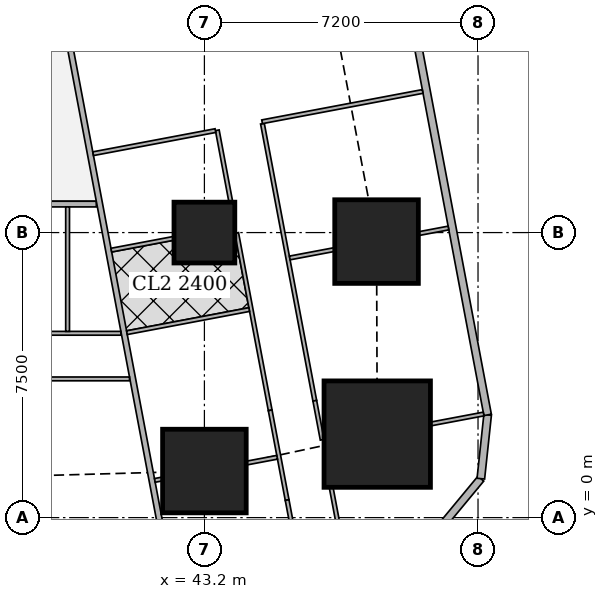
"""IFC4 building model, lengths in metres.
Left out: names, types, materials, properties, quantities, classifications, styles, units other than length and angle.
Written with IfcOpenShell. Run it as: python <this file> out.ifc"""

import sys

from ifc_helpers import new_model, si_unit, direction, frame, frame_2d, origin, origin_2d, place, context, subcontext, project, spatial, rectangle, extrude, element, fill, save


model = new_model("IFC4")
c1 = context("Model", 3, precision=1e-05, world=origin(), true_north=direction((0.0, 1.0)))
c2 = subcontext(c1, "Body", "Model", "MODEL_VIEW")
j1 = project(units=[si_unit("LENGTHUNIT", "METRE"), si_unit("PLANEANGLEUNIT", "RADIAN")], contexts=[c1])
p1 = place(None, origin())
s1 = spatial("IfcSite", under=j1, at=p1, CompositionType="ELEMENT")
p2 = place(p1, origin())
s2 = spatial("IfcBuilding", under=s1, at=p2, CompositionType="ELEMENT")
p3 = place(p2, frame((0.0, 0.0, 81.65)))
s3 = spatial("IfcBuildingStorey", under=s2, at=p3, CompositionType="ELEMENT", Elevation=81.65)
p4 = place(p3, frame((43.2, 1.225, 0.0), z_axis=(0.0, 0.0, 1.0), x_axis=(1.0, 0.0, 0.0)))
e1 = element("IfcColumn", 1, at=p4, inside=s3, PredefinedType="COLUMN", context=c2, shape_type="SweptSolid", body=[
    extrude(rectangle(XDim=2.2, YDim=2.2, at=origin_2d()), origin(), (0.0, 0.0, 1.0), 3.75),
])
p5 = place(p3, frame((47.748, 2.197, 0.0), z_axis=(0.0, 0.0, 1.0), x_axis=(1.0, 0.0, 0.0)))
e2 = element("IfcColumn", 2, at=p5, inside=s3, PredefinedType="COLUMN", context=c2, shape_type="SweptSolid", body=[
    extrude(rectangle(XDim=2.8, YDim=2.8, at=origin_2d()), origin(), (0.0, 0.0, 1.0), 3.75),
])
p6 = place(p3, frame((43.2, 7.5, 0.0), z_axis=(0.0, 0.0, 1.0), x_axis=(1.0, 0.0, 0.0)))
e3 = element("IfcColumn", 3, at=p6, inside=s3, PredefinedType="COLUMN", context=c2, shape_type="SweptSolid", body=[
    extrude(rectangle(XDim=1.6, YDim=1.6, at=origin_2d()), origin(), (0.0, 0.0, 1.0), 3.75),
])
p7 = place(p3, frame((47.73, 7.263, 0.0), z_axis=(0.0, 0.0, 1.0), x_axis=(1.0, 0.0, 0.0)))
e4 = element("IfcColumn", 4, at=p7, inside=s3, PredefinedType="COLUMN", context=c2, shape_type="SweptSolid", body=[
    extrude(rectangle(XDim=2.2, YDim=2.2, at=origin_2d()), origin(), (0.0, 0.0, 1.0), 3.75),
])
p8 = place(p3, frame((49.407, -0.263, 0.0), z_axis=(0.0, 0.0, 1.0), x_axis=(0.638042593423, 0.770001070764, 0.0)))
e5 = element("IfcWall", 5, at=p8, inside=s3, PredefinedType="SOLIDWALL", context=c2, shape_type="SweptSolid", body=[
    extrude(rectangle(XDim=1.673, YDim=0.2, at=frame_2d((0.836, 0.0))), origin(), (0.0, 0.0, 1.0), 3.5),
])
p9 = place(p3, frame((50.474, 1.025, 0.0), z_axis=(0.0, 0.0, 1.0), x_axis=(0.106047815515, 0.994361031429, 0.0)))
e6 = element("IfcWall", 6, at=p9, inside=s3, PredefinedType="SOLIDWALL", context=c2, shape_type="SweptSolid", body=[
    extrude(rectangle(XDim=1.688, YDim=0.2, at=frame_2d((0.844, 0.0))), origin(), (0.0, 0.0, 1.0), 3.5),
])
p10 = place(p3, frame((50.653, 2.703, 0.0), z_axis=(0.0, 0.0, 1.0), x_axis=(-0.185612026696, 0.982623109613, 0.0)))
e7 = element("IfcWall", 7, at=p10, inside=s3, PredefinedType="SOLIDWALL", context=c2, shape_type="SweptSolid", body=[
    extrude(rectangle(XDim=41.393, YDim=0.2, at=frame_2d((20.697, 0.0))), origin(), (0.0, 0.0, 1.0), 3.5),
])
p11 = place(p10, frame((1.633, 0.0, 0.9)))
e8 = element("IfcOpeningElement", 8, at=p11, cuts=e7, PredefinedType="OPENING", context=c2, shape_type="SweptSolid", body=[
    extrude(rectangle(XDim=1.8, YDim=1.5, at=frame_2d((0.9, 0.75))), frame((0.0, 0.11, 0.0), z_axis=(0.0, -1.0, 0.0), x_axis=(1.0, 0.0, 0.0)), (0.0, 0.0, 1.0), 0.22),
])
p12 = place(p10, frame((6.032, 0.0, 0.9)))
e9 = element("IfcOpeningElement", 9, at=p12, cuts=e7, PredefinedType="OPENING", context=c2, shape_type="SweptSolid", body=[
    extrude(rectangle(XDim=1.8, YDim=1.5, at=frame_2d((0.9, 0.75))), frame((0.0, 0.11, 0.0), z_axis=(0.0, -1.0, 0.0), x_axis=(1.0, 0.0, 0.0)), (0.0, 0.0, 1.0), 0.22),
])
p13 = place(p10, frame((9.848, 0.0, 0.9)))
e10 = element("IfcOpeningElement", 10, at=p13, cuts=e7, PredefinedType="OPENING", context=c2, shape_type="SweptSolid", body=[
    extrude(rectangle(XDim=1.8, YDim=1.5, at=frame_2d((0.9, 0.75))), frame((0.0, 0.11, 0.0), z_axis=(0.0, -1.0, 0.0), x_axis=(1.0, 0.0, 0.0)), (0.0, 0.0, 1.0), 0.22),
])
p14 = place(p10, frame((13.664, 0.0, 0.9)))
e11 = element("IfcOpeningElement", 11, at=p14, cuts=e7, PredefinedType="OPENING", context=c2, shape_type="SweptSolid", body=[
    extrude(rectangle(XDim=1.8, YDim=1.5, at=frame_2d((0.9, 0.75))), frame((0.0, 0.11, 0.0), z_axis=(0.0, -1.0, 0.0), x_axis=(1.0, 0.0, 0.0)), (0.0, 0.0, 1.0), 0.22),
])
p15 = place(p10, frame((17.481, 0.0, 0.9)))
e12 = element("IfcOpeningElement", 12, at=p15, cuts=e7, PredefinedType="OPENING", context=c2, shape_type="SweptSolid", body=[
    extrude(rectangle(XDim=1.8, YDim=1.5, at=frame_2d((0.9, 0.75))), frame((0.0, 0.11, 0.0), z_axis=(0.0, -1.0, 0.0), x_axis=(1.0, 0.0, 0.0)), (0.0, 0.0, 1.0), 0.22),
])
p16 = place(p10, frame((21.297, 0.0, 0.9)))
e13 = element("IfcOpeningElement", 13, at=p16, cuts=e7, PredefinedType="OPENING", context=c2, shape_type="SweptSolid", body=[
    extrude(rectangle(XDim=1.8, YDim=1.5, at=frame_2d((0.9, 0.75))), frame((0.0, 0.11, 0.0), z_axis=(0.0, -1.0, 0.0), x_axis=(1.0, 0.0, 0.0)), (0.0, 0.0, 1.0), 0.22),
])
p17 = place(p10, frame((25.113, 0.0, 0.9)))
e14 = element("IfcOpeningElement", 14, at=p17, cuts=e7, PredefinedType="OPENING", context=c2, shape_type="SweptSolid", body=[
    extrude(rectangle(XDim=1.8, YDim=1.5, at=frame_2d((0.9, 0.75))), frame((0.0, 0.11, 0.0), z_axis=(0.0, -1.0, 0.0), x_axis=(1.0, 0.0, 0.0)), (0.0, 0.0, 1.0), 0.22),
])
p18 = place(p10, frame((28.93, 0.0, 0.9)))
e15 = element("IfcOpeningElement", 15, at=p18, cuts=e7, PredefinedType="OPENING", context=c2, shape_type="SweptSolid", body=[
    extrude(rectangle(XDim=1.8, YDim=1.5, at=frame_2d((0.9, 0.75))), frame((0.0, 0.11, 0.0), z_axis=(0.0, -1.0, 0.0), x_axis=(1.0, 0.0, 0.0)), (0.0, 0.0, 1.0), 0.22),
])
p19 = place(p10, frame((32.746, 0.0, 0.9)))
e16 = element("IfcOpeningElement", 16, at=p19, cuts=e7, PredefinedType="OPENING", context=c2, shape_type="SweptSolid", body=[
    extrude(rectangle(XDim=1.8, YDim=1.5, at=frame_2d((0.9, 0.75))), frame((0.0, 0.11, 0.0), z_axis=(0.0, -1.0, 0.0), x_axis=(1.0, 0.0, 0.0)), (0.0, 0.0, 1.0), 0.22),
])
p20 = place(p10, frame((36.481, 0.0, 0.9)))
e17 = element("IfcOpeningElement", 17, at=p20, cuts=e7, PredefinedType="OPENING", context=c2, shape_type="SweptSolid", body=[
    extrude(rectangle(XDim=1.8, YDim=1.5, at=frame_2d((0.9, 0.75))), frame((0.0, 0.11, 0.0), z_axis=(0.0, -1.0, 0.0), x_axis=(1.0, 0.0, 0.0)), (0.0, 0.0, 1.0), 0.22),
])
p21 = place(p3, frame((40.356, 8.25, 0.0), z_axis=(0.0, 0.0, 1.0), x_axis=(-1.0, 0.0, 0.0)))
e18 = element("IfcWall", 18, at=p21, inside=s3, PredefinedType="SOLIDWALL", context=c2, shape_type="SweptSolid", body=[
    extrude(rectangle(XDim=3.555, YDim=0.15, at=frame_2d((1.777, 0.0))), origin(), (0.0, 0.0, 1.0), 3.5),
])
p22 = place(p3, frame((33.382, 45.65, 0.0), z_axis=(0.0, 0.0, 1.0), x_axis=(0.185593544777, -0.982626600565, 0.0)))
e19 = element("IfcWall", 19, at=p22, inside=s3, PredefinedType="SOLIDWALL", context=c2, shape_type="SweptSolid", body=[
    extrude(rectangle(XDim=47.118, YDim=0.15, at=frame_2d((23.559, 0.0))), origin(), (0.0, 0.0, 1.0), 2.2),
])
p23 = place(p22, frame((19.054, 0.0, 0.0)))
e20 = element("IfcOpeningElement", 20, at=p23, cuts=e19, PredefinedType="OPENING", context=c2, shape_type="SweptSolid", body=[
    extrude(rectangle(XDim=1.0, YDim=2.1, at=frame_2d((0.5, 1.05))), frame((0.0, 0.085, 0.0), z_axis=(0.0, -1.0, 0.0), x_axis=(1.0, 0.0, 0.0)), (0.0, 0.0, 1.0), 0.17),
])
p24 = place(p22, frame((22.87, 0.0, 0.0)))
e21 = element("IfcOpeningElement", 21, at=p24, cuts=e19, PredefinedType="OPENING", context=c2, shape_type="SweptSolid", body=[
    extrude(rectangle(XDim=1.0, YDim=2.1, at=frame_2d((0.5, 1.05))), frame((0.0, 0.085, 0.0), z_axis=(0.0, -1.0, 0.0), x_axis=(1.0, 0.0, 0.0)), (0.0, 0.0, 1.0), 0.17),
])
p25 = place(p22, frame((33.833, 0.0, 0.0)))
e22 = element("IfcOpeningElement", 22, at=p25, cuts=e19, PredefinedType="OPENING", context=c2, shape_type="SweptSolid", body=[
    extrude(rectangle(XDim=1.0, YDim=2.1, at=frame_2d((0.5, 1.05))), frame((0.0, 0.085, 0.0), z_axis=(0.0, -1.0, 0.0), x_axis=(1.0, 0.0, 0.0)), (0.0, 0.0, 1.0), 0.17),
])
p26 = place(p3, frame((41.229, 3.65, 0.0), z_axis=(0.0, 0.0, 1.0), x_axis=(-1.0, 0.0, 0.0)))
e23 = element("IfcWall", 23, at=p26, inside=s3, PredefinedType="PARTITIONING", context=c2, shape_type="SweptSolid", body=[
    extrude(rectangle(XDim=8.829, YDim=0.1, at=frame_2d((4.415, 0.0))), origin(), (0.0, 0.0, 1.0), 3.5),
])
p27 = place(p26, frame((7.729, 0.0, 0.0)))
e24 = element("IfcOpeningElement", 24, at=p27, cuts=e23, PredefinedType="OPENING", context=c2, shape_type="SweptSolid", body=[
    extrude(rectangle(XDim=0.9, YDim=2.1, at=frame_2d((0.45, 1.05))), frame((0.0, 0.06, 0.0), z_axis=(0.0, -1.0, 0.0), x_axis=(1.0, 0.0, 0.0)), (0.0, 0.0, 1.0), 0.12),
])
p28 = place(p26, frame((4.129, 0.0, 0.0)))
e25 = element("IfcOpeningElement", 25, at=p28, cuts=e23, PredefinedType="OPENING", context=c2, shape_type="SweptSolid", body=[
    extrude(rectangle(XDim=0.9, YDim=2.1, at=frame_2d((0.45, 1.05))), frame((0.0, 0.06, 0.0), z_axis=(0.0, -1.0, 0.0), x_axis=(1.0, 0.0, 0.0)), (0.0, 0.0, 1.0), 0.12),
])
p29 = place(p3, frame((41.002, 4.85, 0.0), z_axis=(0.0, 0.0, 1.0), x_axis=(-1.0, 0.0, 0.0)))
e26 = element("IfcWall", 26, at=p29, inside=s3, PredefinedType="PARTITIONING", context=c2, shape_type="SweptSolid", body=[
    extrude(rectangle(XDim=8.602, YDim=0.1, at=frame_2d((4.301, 0.0))), origin(), (0.0, 0.0, 1.0), 3.5),
])
p30 = place(p29, frame((7.047, 0.0, 0.0)))
e27 = element("IfcOpeningElement", 27, at=p30, cuts=e26, PredefinedType="OPENING", context=c2, shape_type="SweptSolid", body=[
    extrude(rectangle(XDim=0.9, YDim=2.1, at=frame_2d((0.45, 1.05))), frame((0.0, 0.06, 0.0), z_axis=(0.0, -1.0, 0.0), x_axis=(1.0, 0.0, 0.0)), (0.0, 0.0, 1.0), 0.12),
])
p31 = place(p29, frame((3.752, 0.0, 0.0)))
e28 = element("IfcOpeningElement", 28, at=p31, cuts=e26, PredefinedType="OPENING", context=c2, shape_type="SweptSolid", body=[
    extrude(rectangle(XDim=0.9, YDim=2.1, at=frame_2d((0.45, 1.05))), frame((0.0, 0.06, 0.0), z_axis=(0.0, -1.0, 0.0), x_axis=(1.0, 0.0, 0.0)), (0.0, 0.0, 1.0), 0.12),
])
p32 = place(p29, frame((0.15, 0.0, 0.0)))
e29 = element("IfcOpeningElement", 29, at=p32, cuts=e26, PredefinedType="OPENING", context=c2, shape_type="SweptSolid", body=[
    extrude(rectangle(XDim=0.9, YDim=2.1, at=frame_2d((0.45, 1.05))), frame((0.0, 0.06, 0.0), z_axis=(0.0, -1.0, 0.0), x_axis=(1.0, 0.0, 0.0)), (0.0, 0.0, 1.0), 0.12),
])
p33 = place(p29, frame((5.247, 0.0, 0.0)))
e30 = element("IfcOpeningElement", 30, at=p33, cuts=e26, PredefinedType="OPENING", context=c2, shape_type="SweptSolid", body=[
    extrude(rectangle(XDim=0.9, YDim=2.1, at=frame_2d((0.45, 1.05))), frame((0.0, 0.06, 0.0), z_axis=(0.0, -1.0, 0.0), x_axis=(1.0, 0.0, 0.0)), (0.0, 0.0, 1.0), 0.12),
])
p34 = place(p29, frame((1.952, 0.0, 0.0)))
e31 = element("IfcOpeningElement", 31, at=p34, cuts=e26, PredefinedType="OPENING", context=c2, shape_type="SweptSolid", body=[
    extrude(rectangle(XDim=0.9, YDim=2.1, at=frame_2d((0.45, 1.05))), frame((0.0, 0.06, 0.0), z_axis=(0.0, -1.0, 0.0), x_axis=(1.0, 0.0, 0.0)), (0.0, 0.0, 1.0), 0.12),
])
p35 = place(p3, frame((39.6, 4.9, 0.0), z_axis=(0.0, 0.0, 1.0), x_axis=(0.0, 1.0, 0.0)))
e32 = element("IfcWall", 32, at=p35, inside=s3, PredefinedType="PARTITIONING", context=c2, shape_type="SweptSolid", body=[
    extrude(rectangle(XDim=3.275, YDim=0.1, at=frame_2d((1.638, 0.0))), origin(), (0.0, 0.0, 1.0), 3.5),
])
p36 = place(p3, frame((44.727, 10.366, 0.0), z_axis=(0.0, 0.0, 1.0), x_axis=(0.185678775129, -0.982610498858, 0.0)))
e33 = element("IfcWall", 33, at=p36, inside=s3, PredefinedType="PARTITIONING", context=c2, shape_type="SweptSolid", body=[
    extrude(rectangle(XDim=7.421, YDim=0.1, at=frame_2d((3.71, 0.0))), origin(), (0.0, 0.0, 1.0), 3.5),
])
p37 = place(p36, frame((0.151, 0.0, 0.0)))
e34 = element("IfcOpeningElement", 34, at=p37, cuts=e33, PredefinedType="OPENING", context=c2, shape_type="SweptSolid", body=[
    extrude(rectangle(XDim=0.9, YDim=2.1, at=frame_2d((0.45, 1.05))), frame((0.0, 0.06, 0.0), z_axis=(0.0, -1.0, 0.0), x_axis=(1.0, 0.0, 0.0)), (0.0, 0.0, 1.0), 0.12),
])
p38 = place(p36, frame((4.55, 0.0, 0.0)))
e35 = element("IfcOpeningElement", 35, at=p38, cuts=e33, PredefinedType="OPENING", context=c2, shape_type="SweptSolid", body=[
    extrude(rectangle(XDim=0.9, YDim=2.1, at=frame_2d((0.45, 1.05))), frame((0.0, 0.06, 0.0), z_axis=(0.0, -1.0, 0.0), x_axis=(1.0, 0.0, 0.0)), (0.0, 0.0, 1.0), 0.12),
])
p39 = place(p3, frame((46.105, 3.074, 0.0), z_axis=(0.0, 0.0, 1.0), x_axis=(0.185897769544, -0.982569091351, 0.0)))
e36 = element("IfcWall", 36, at=p39, inside=s3, PredefinedType="PARTITIONING", context=c2, shape_type="SweptSolid", body=[
    extrude(rectangle(XDim=1.044, YDim=0.1, at=frame_2d((0.522, 0.0))), origin(), (0.0, 0.0, 1.0), 2.05),
])
p40 = place(p3, frame((46.537, 0.787, 0.0), z_axis=(0.0, 0.0, 1.0), x_axis=(0.185348284603, -0.982672892368, 0.0)))
e37 = element("IfcWall", 37, at=p40, inside=s3, PredefinedType="PARTITIONING", context=c2, shape_type="SweptSolid", body=[
    extrude(rectangle(XDim=1.419, YDim=0.1, at=frame_2d((0.709, 0.0))), origin(), (0.0, 0.0, 1.0), 2.05),
])
p41 = place(p3, frame((43.539, 10.192, 0.0), z_axis=(0.0, 0.0, 1.0), x_axis=(0.185366049966, -0.982669541362, 0.0)))
e38 = element("IfcWall", 38, at=p41, inside=s3, PredefinedType="PARTITIONING", context=c2, shape_type="SweptSolid", body=[
    extrude(rectangle(XDim=1.915, YDim=0.1, at=frame_2d((0.958, 0.0))), origin(), (0.0, 0.0, 1.0), 3.5),
])
p42 = place(p3, frame((44.049, 7.49, 0.0), z_axis=(0.0, 0.0, 1.0), x_axis=(0.185666332607, -0.982612849975, 0.0)))
e39 = element("IfcWall", 39, at=p42, inside=s3, PredefinedType="PARTITIONING", context=c2, shape_type="SweptSolid", body=[
    extrude(rectangle(XDim=4.75, YDim=0.1, at=frame_2d((2.375, 0.0))), origin(), (0.0, 0.0, 1.0), 3.5),
])
p43 = place(p42, frame((0.8, 0.0, 0.0)))
e40 = element("IfcOpeningElement", 40, at=p43, cuts=e39, PredefinedType="OPENING", context=c2, shape_type="SweptSolid", body=[
    extrude(rectangle(XDim=0.9, YDim=2.1, at=frame_2d((0.45, 1.05))), frame((0.0, 0.06, 0.0), z_axis=(0.0, -1.0, 0.0), x_axis=(1.0, 0.0, 0.0)), (0.0, 0.0, 1.0), 0.12),
])
p44 = place(p42, frame((2.396, 0.0, 0.0)))
e41 = element("IfcOpeningElement", 41, at=p44, cuts=e39, PredefinedType="OPENING", context=c2, shape_type="SweptSolid", body=[
    extrude(rectangle(XDim=0.9, YDim=2.1, at=frame_2d((0.45, 1.05))), frame((0.0, 0.06, 0.0), z_axis=(0.0, -1.0, 0.0), x_axis=(1.0, 0.0, 0.0)), (0.0, 0.0, 1.0), 0.12),
])
p45 = place(p3, frame((44.931, 2.823, 0.0), z_axis=(0.0, 0.0, 1.0), x_axis=(0.185631845838, -0.982619365681, 0.0)))
e42 = element("IfcWall", 42, at=p45, inside=s3, PredefinedType="PARTITIONING", context=c2, shape_type="SweptSolid", body=[
    extrude(rectangle(XDim=2.403, YDim=0.1, at=frame_2d((1.201, 0.0))), origin(), (0.0, 0.0, 1.0), 2.05),
])
p46 = place(p3, frame((45.377, 0.462, 0.0), z_axis=(0.0, 0.0, 1.0), x_axis=(0.185513480919, -0.982641719243, 0.0)))
e43 = element("IfcWall", 43, at=p46, inside=s3, PredefinedType="PARTITIONING", context=c2, shape_type="SweptSolid", body=[
    extrude(rectangle(XDim=1.095, YDim=0.1, at=frame_2d((0.547, 0.0))), origin(), (0.0, 0.0, 1.0), 3.5),
])
p47 = place(p3, frame((48.943, 11.213, 0.0), z_axis=(0.0, 0.0, 1.0), x_axis=(-0.982633535512, -0.185556823879, 0.0)))
e44 = element("IfcWall", 44, at=p47, inside=s3, PredefinedType="PARTITIONING", context=c2, shape_type="SweptSolid", body=[
    extrude(rectangle(XDim=4.3, YDim=0.1, at=frame_2d((2.15, 0.0))), origin(), (0.0, 0.0, 1.0), 2.2),
])
p48 = place(p3, frame((49.622, 7.62, 0.0), z_axis=(0.0, 0.0, 1.0), x_axis=(-0.982512656401, -0.186195810938, 0.0)))
e45 = element("IfcWall", 45, at=p48, inside=s3, PredefinedType="PARTITIONING", context=c2, shape_type="SweptSolid", body=[
    extrude(rectangle(XDim=0.796, YDim=0.1, at=frame_2d((0.398, 0.0))), origin(), (0.0, 0.0, 1.0), 2.05),
])
p49 = place(p3, frame((46.62, 7.053, 0.0), z_axis=(0.0, 0.0, 1.0), x_axis=(-0.982749355621, -0.18494243436, 0.0)))
e46 = element("IfcWall", 46, at=p49, inside=s3, PredefinedType="PARTITIONING", context=c2, shape_type="SweptSolid", body=[
    extrude(rectangle(XDim=1.195, YDim=0.1, at=frame_2d((0.597, 0.0))), origin(), (0.0, 0.0, 1.0), 2.05),
])
p50 = place(p3, frame((50.547, 2.726, 0.0), z_axis=(0.0, 0.0, 1.0), x_axis=(-0.982680053146, -0.185310315822, 0.0)))
e47 = element("IfcWall", 47, at=p50, inside=s3, PredefinedType="PARTITIONING", context=c2, shape_type="SweptSolid", body=[
    extrude(rectangle(XDim=1.414, YDim=0.1, at=frame_2d((0.707, 0.0))), origin(), (0.0, 0.0, 1.0), 3.5),
])
p51 = place(p3, frame((43.49, 10.183, 0.0), z_axis=(0.0, 0.0, 1.0), x_axis=(-0.982607026909, -0.185697147715, 0.0)))
e48 = element("IfcWall", 48, at=p51, inside=s3, PredefinedType="PARTITIONING", context=c2, shape_type="SweptSolid", body=[
    extrude(rectangle(XDim=3.275, YDim=0.1, at=frame_2d((1.637, 0.0))), origin(), (0.0, 0.0, 1.0), 3.5),
])
p52 = place(p51, frame((1.2, 0.0, 0.0)))
e49 = element("IfcOpeningElement", 49, at=p52, cuts=e48, PredefinedType="OPENING", context=c2, shape_type="SweptSolid", body=[
    extrude(rectangle(XDim=0.9, YDim=2.1, at=frame_2d((0.45, 1.05))), frame((0.0, 0.06, 0.0), z_axis=(0.0, -1.0, 0.0), x_axis=(1.0, 0.0, 0.0)), (0.0, 0.0, 1.0), 0.12),
])
p53 = place(p3, frame((42.39, 7.348, 0.0), z_axis=(0.0, 0.0, 1.0), x_axis=(-0.9825976927, -0.185746532405, 0.0)))
e50 = element("IfcWall", 50, at=p53, inside=s3, PredefinedType="PARTITIONING", context=c2, shape_type="SweptSolid", body=[
    extrude(rectangle(XDim=1.668, YDim=0.1, at=frame_2d((0.834, 0.0))), origin(), (0.0, 0.0, 1.0), 3.5),
])
p54 = place(p3, frame((45.114, 1.587, 0.0), z_axis=(0.0, 0.0, 1.0), x_axis=(-0.982624706348, -0.185603573443, 0.0)))
e51 = element("IfcWall", 51, at=p54, inside=s3, PredefinedType="PARTITIONING", context=c2, shape_type="SweptSolid", body=[
    extrude(rectangle(XDim=0.818, YDim=0.1, at=frame_2d((0.409, 0.0))), origin(), (0.0, 0.0, 1.0), 2.05),
])
p55 = place(p3, frame((42.09, 1.016, 0.0), z_axis=(0.0, 0.0, 1.0), x_axis=(-0.982208563973, -0.187793335502, 0.0)))
e52 = element("IfcWall", 52, at=p55, inside=s3, PredefinedType="PARTITIONING", context=c2, shape_type="SweptSolid", body=[
    extrude(rectangle(XDim=0.198, YDim=0.1, at=frame_2d((0.099, 0.0))), origin(), (0.0, 0.0, 1.0), 2.05),
])
p56 = place(p3, frame((44.379, 5.474, 0.0), z_axis=(0.0, 0.0, 1.0), x_axis=(-0.982607026909, -0.185697147715, 0.0)))
e53 = element("IfcWall", 53, at=p56, inside=s3, PredefinedType="PARTITIONING", context=c2, shape_type="SweptSolid", body=[
    extrude(rectangle(XDim=3.275, YDim=0.1, at=frame_2d((1.637, 0.0))), origin(), (0.0, 0.0, 1.0), 3.5),
])
p57 = place(p11, origin())
e54 = element("IfcWindow", 54, at=p57, inside=s3, PartitioningType="SINGLE_PANEL", PredefinedType="WINDOW", context=c2, shape_type="SweptSolid", body=[
    extrude(rectangle(XDim=1.8, YDim=1.5, at=frame_2d((0.9, 0.75))), frame((0.0, 0.03, 0.0), z_axis=(0.0, -1.0, 0.0), x_axis=(1.0, 0.0, 0.0)), (0.0, 0.0, 1.0), 0.06),
])
fill(e8, e54)
p58 = place(p12, origin())
e55 = element("IfcWindow", 55, at=p58, inside=s3, PartitioningType="SINGLE_PANEL", PredefinedType="WINDOW", context=c2, shape_type="SweptSolid", body=[
    extrude(rectangle(XDim=1.8, YDim=1.5, at=frame_2d((0.9, 0.75))), frame((0.0, 0.03, 0.0), z_axis=(0.0, -1.0, 0.0), x_axis=(1.0, 0.0, 0.0)), (0.0, 0.0, 1.0), 0.06),
])
fill(e9, e55)
p59 = place(p32, origin())
e56 = element("IfcDoor", 56, at=p59, inside=s3, OperationType="SINGLE_SWING_RIGHT", PredefinedType="DOOR", context=c2, shape_type="SweptSolid", body=[
    extrude(rectangle(XDim=0.9, YDim=2.1, at=frame_2d((0.45, 1.05))), frame((0.0, 0.025, 0.0), z_axis=(0.0, -1.0, 0.0), x_axis=(1.0, 0.0, 0.0)), (0.0, 0.0, 1.0), 0.05),
])
fill(e29, e56)
p60 = place(p37, origin())
e57 = element("IfcDoor", 57, at=p60, inside=s3, OperationType="SINGLE_SWING_LEFT", PredefinedType="DOOR", context=c2, shape_type="SweptSolid", body=[
    extrude(rectangle(XDim=0.9, YDim=2.1, at=frame_2d((0.45, 1.05))), frame((0.0, 0.025, 0.0), z_axis=(0.0, -1.0, 0.0), x_axis=(1.0, 0.0, 0.0)), (0.0, 0.0, 1.0), 0.05),
])
fill(e34, e57)
p61 = place(p38, origin())
e58 = element("IfcDoor", 58, at=p61, inside=s3, OperationType="SINGLE_SWING_LEFT", PredefinedType="DOOR", context=c2, shape_type="SweptSolid", body=[
    extrude(rectangle(XDim=0.9, YDim=2.1, at=frame_2d((0.45, 1.05))), frame((0.0, 0.025, 0.0), z_axis=(0.0, -1.0, 0.0), x_axis=(1.0, 0.0, 0.0)), (0.0, 0.0, 1.0), 0.05),
])
fill(e35, e58)
p62 = place(p43, origin())
e59 = element("IfcDoor", 59, at=p62, inside=s3, OperationType="SINGLE_SWING_LEFT", PredefinedType="DOOR", context=c2, shape_type="SweptSolid", body=[
    extrude(rectangle(XDim=0.9, YDim=2.1, at=frame_2d((0.45, 1.05))), frame((0.0, 0.025, 0.0), z_axis=(0.0, -1.0, 0.0), x_axis=(1.0, 0.0, 0.0)), (0.0, 0.0, 1.0), 0.05),
])
fill(e40, e59)
p63 = place(p44, origin())
e60 = element("IfcDoor", 60, at=p63, inside=s3, OperationType="SINGLE_SWING_RIGHT", PredefinedType="DOOR", context=c2, shape_type="SweptSolid", body=[
    extrude(rectangle(XDim=0.9, YDim=2.1, at=frame_2d((0.45, 1.05))), frame((0.0, 0.025, 0.0), z_axis=(0.0, -1.0, 0.0), x_axis=(1.0, 0.0, 0.0)), (0.0, 0.0, 1.0), 0.05),
])
fill(e41, e60)
p64 = place(p25, origin())
e61 = element("IfcDoor", 61, at=p64, inside=s3, OperationType="SINGLE_SWING_LEFT", PredefinedType="DOOR", context=c2, shape_type="SweptSolid", body=[
    extrude(rectangle(XDim=1.0, YDim=2.1, at=frame_2d((0.5, 1.05))), frame((0.0, 0.025, 0.0), z_axis=(0.0, -1.0, 0.0), x_axis=(1.0, 0.0, 0.0)), (0.0, 0.0, 1.0), 0.05),
])
fill(e22, e61)
p65 = place(p52, origin())
e62 = element("IfcDoor", 62, at=p65, inside=s3, OperationType="SINGLE_SWING_RIGHT", PredefinedType="DOOR", context=c2, shape_type="SweptSolid", body=[
    extrude(rectangle(XDim=0.9, YDim=2.1, at=frame_2d((0.45, 1.05))), frame((0.0, 0.025, 0.0), z_axis=(0.0, -1.0, 0.0), x_axis=(1.0, 0.0, 0.0)), (0.0, 0.0, 1.0), 0.05),
])
fill(e49, e62)
save(model, sys.argv[1])
